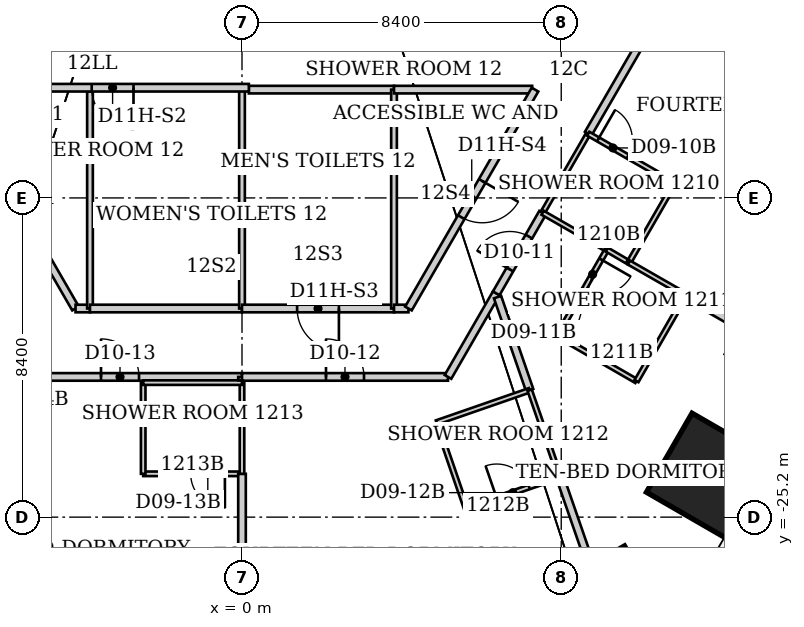
"""IFC4 building model, lengths in metres.
Left out: names, types, materials, properties, quantities, classifications, styles, units other than length and angle.
Written with IfcOpenShell. Run it as: python <this file> out.ifc"""

import sys

from ifc_helpers import new_model, si_unit, direction, frame, frame_2d, origin, origin_2d, place, context, subcontext, project, spatial, rectangle, extrude, clip, halfspace, element, fill, save


model = new_model("IFC4")
c1 = context("Model", 3, precision=1e-05, world=origin(), true_north=direction((0.0, 1.0)))
c2 = subcontext(c1, "Body", "Model", "MODEL_VIEW")
j1 = project(units=[si_unit("LENGTHUNIT", "METRE"), si_unit("PLANEANGLEUNIT", "RADIAN")], contexts=[c1])
p1 = place(None, origin())
s1 = spatial("IfcSite", under=j1, at=p1, CompositionType="ELEMENT")
p2 = place(p1, origin())
s2 = spatial("IfcBuilding", under=s1, at=p2, CompositionType="ELEMENT")
p3 = place(p2, frame((0.0, 0.0, 53.4)))
s3 = spatial("IfcBuildingStorey", under=s2, at=p3, CompositionType="ELEMENT", Elevation=53.4)
p4 = place(p3, frame((12.282, -24.105, 0.0), z_axis=(0.0, 0.0, 1.0), x_axis=(0.866025403784, -0.5, 0.0)))
e1 = element("IfcColumn", 1, at=p4, inside=s3, PredefinedType="COLUMN", context=c2, shape_type="SweptSolid", body=[
    clip(extrude(rectangle(XDim=2.4, YDim=2.4, at=origin_2d()), origin(), (0.0, 0.0, 1.0), 3.728), halfspace(frame((0.0, 0.0, 3.64)), False)),
])
p5 = place(p3, frame((9.106, -27.897, 0.0), z_axis=(0.0, 0.0, 1.0), x_axis=(0.5, -0.866025403784, 0.0)))
e2 = element("IfcColumn", 2, at=p5, inside=s3, PredefinedType="COLUMN", context=c2, shape_type="SweptSolid", body=[
    clip(extrude(rectangle(XDim=2.4, YDim=3.6, at=origin_2d()), origin(), (0.0, 0.0, 1.0), 3.726), halfspace(frame((0.0, 0.0, 3.64)), False)),
])
p6 = place(p3, frame((-5.42, -21.51, 0.0), z_axis=(0.0, 0.0, 1.0), x_axis=(1.0, 0.0, 0.0)))
e3 = element("IfcWall", 3, at=p6, inside=s3, PredefinedType="PARTITIONING", context=c2, shape_type="SweptSolid", body=[
    extrude(rectangle(XDim=5.42, YDim=0.2, at=frame_2d((2.71, 0.0))), origin(), (0.0, 0.0, 1.0), 3.64),
])
p7 = place(p6, frame((1.71, 0.0, 0.0)))
e4 = element("IfcOpeningElement", 4, at=p7, cuts=e3, PredefinedType="OPENING", context=c2, shape_type="SweptSolid", body=[
    extrude(rectangle(XDim=1.0, YDim=2.13, at=frame_2d((0.5, 1.065))), frame((0.0, 0.1, 0.0), z_axis=(0.0, -1.0, 0.0), x_axis=(1.0, 0.0, 0.0)), (0.0, 0.0, 1.0), 0.2),
])
p8 = place(p3, frame((-4.38, -19.71, 0.0), z_axis=(0.0, 0.0, 1.0), x_axis=(-0.500523653757, 0.865722860984, 0.0)))
e5 = element("IfcWall", 5, at=p8, inside=s3, PredefinedType="PARTITIONING", context=c2, shape_type="SweptSolid", body=[
    extrude(rectangle(XDim=6.628, YDim=0.2, at=frame_2d((3.314, 0.0))), origin(), (0.0, 0.0, 1.0), 3.64),
])
p9 = place(p8, frame((2.764, 0.0, 0.0)))
e6 = element("IfcOpeningElement", 6, at=p9, cuts=e5, PredefinedType="OPENING", context=c2, shape_type="SweptSolid", body=[
    extrude(rectangle(XDim=1.1, YDim=2.2, at=frame_2d((0.55, 1.1))), frame((0.0, 0.1, 0.0), z_axis=(0.0, -1.0, 0.0), x_axis=(1.0, 0.0, 0.0)), (0.0, 0.0, 1.0), 0.2),
])
p10 = place(p3, frame((-4.0, -19.71, 0.0), z_axis=(0.0, 0.0, 1.0), x_axis=(-1.0, 0.0, 0.0)))
e7 = element("IfcWall", 7, at=p10, inside=s3, PredefinedType="PARTITIONING", context=c2, shape_type="SweptSolid", body=[
    extrude(rectangle(XDim=0.38, YDim=0.2, at=frame_2d((0.19, 0.0))), origin(), (0.0, 0.0, 1.0), 3.64),
])
p11 = place(p3, frame((-4.0, -14.0, 0.0), z_axis=(0.0, 0.0, 1.0), x_axis=(0.0, -1.0, 0.0)))
e8 = element("IfcWall", 8, at=p11, inside=s3, PredefinedType="PARTITIONING", context=c2, shape_type="SweptSolid", body=[
    extrude(rectangle(XDim=5.71, YDim=0.15, at=frame_2d((2.855, 0.0))), origin(), (0.0, 0.0, 1.0), 3.64),
])
p12 = place(p3, frame((-2.6, -24.06, 0.0), z_axis=(0.0, 0.0, 1.0), x_axis=(1.0, 0.0, 0.0)))
e9 = element("IfcWall", 9, at=p12, inside=s3, PredefinedType="PARTITIONING", context=c2, shape_type="SweptSolid", body=[
    extrude(rectangle(XDim=2.6, YDim=0.12, at=frame_2d((1.3, 0.0))), origin(), (0.0, 0.0, 1.0), 3.64),
])
p13 = place(p12, frame((1.25, 0.0, 0.0)))
e10 = element("IfcOpeningElement", 10, at=p13, cuts=e9, PredefinedType="OPENING", context=c2, shape_type="SweptSolid", body=[
    extrude(rectangle(XDim=0.9, YDim=2.03, at=frame_2d((0.45, 1.015))), frame((0.0, 0.06, 0.0), z_axis=(0.0, -1.0, 0.0), x_axis=(1.0, 0.0, 0.0)), (0.0, 0.0, 1.0), 0.12),
])
p14 = place(p3, frame((-2.6, -21.66, 0.0), z_axis=(0.0, 0.0, 1.0), x_axis=(0.0, -1.0, 0.0)))
e11 = element("IfcWall", 11, at=p14, inside=s3, PredefinedType="PARTITIONING", context=c2, shape_type="SweptSolid", body=[
    extrude(rectangle(XDim=2.4, YDim=0.12, at=frame_2d((1.2, 0.0))), origin(), (0.0, 0.0, 1.0), 3.64),
])
p15 = place(p3, frame((0.0, -29.89, 0.0), z_axis=(0.0, 0.0, 1.0), x_axis=(0.0, 1.0, 0.0)))
e12 = element("IfcWall", 12, at=p15, inside=s3, PredefinedType="PARTITIONING", context=c2, shape_type="SweptSolid", body=[
    extrude(rectangle(XDim=5.83, YDim=0.2, at=frame_2d((2.915, 0.0))), origin(), (0.0, 0.0, 1.0), 2.86),
])
p16 = place(p3, frame((0.0, -24.06, 0.0), z_axis=(0.0, 0.0, 1.0), x_axis=(0.0, 1.0, 0.0)))
e13 = element("IfcWall", 13, at=p16, inside=s3, PredefinedType="PARTITIONING", context=c2, shape_type="SweptSolid", body=[
    extrude(rectangle(XDim=2.4, YDim=0.12, at=frame_2d((1.2, 0.0))), origin(), (0.0, 0.0, 1.0), 2.86),
])
p17 = place(p3, frame((0.0, -21.66, 0.0), z_axis=(0.0, 0.0, 1.0), x_axis=(-1.0, 0.0, 0.0)))
e14 = element("IfcWall", 14, at=p17, inside=s3, PredefinedType="PARTITIONING", context=c2, shape_type="SweptSolid", body=[
    extrude(rectangle(XDim=2.6, YDim=0.12, at=frame_2d((1.3, 0.0))), origin(), (0.0, 0.0, 1.0), 3.64),
])
p18 = place(p3, frame((0.0, -21.6, 0.0), z_axis=(0.0, 0.0, 1.0), x_axis=(0.0, 1.0, 0.0)))
e15 = element("IfcWall", 15, at=p18, inside=s3, PredefinedType="PARTITIONING", context=c2, shape_type="SweptSolid", body=[
    extrude(rectangle(XDim=0.09, YDim=0.2, at=frame_2d((0.045, 0.0))), origin(), (0.0, 0.0, 1.0), 3.64),
])
p19 = place(p3, frame((0.0, -21.51, 0.0), z_axis=(0.0, 0.0, 1.0), x_axis=(1.0, 0.0, 0.0)))
e16 = element("IfcWall", 16, at=p19, inside=s3, PredefinedType="PARTITIONING", context=c2, shape_type="SweptSolid", body=[
    extrude(rectangle(XDim=5.42, YDim=0.2, at=frame_2d((2.71, 0.0))), origin(), (0.0, 0.0, 1.0), 3.64),
])
p20 = place(p19, frame((2.21, 0.0, 0.0)))
e17 = element("IfcOpeningElement", 17, at=p20, cuts=e16, PredefinedType="OPENING", context=c2, shape_type="SweptSolid", body=[
    extrude(rectangle(XDim=1.0, YDim=2.13, at=frame_2d((0.5, 1.065))), frame((0.0, 0.1, 0.0), z_axis=(0.0, -1.0, 0.0), x_axis=(1.0, 0.0, 0.0)), (0.0, 0.0, 1.0), 0.2),
])
p21 = place(p3, frame((0.0, -19.71, 0.0), z_axis=(0.0, 0.0, 1.0), x_axis=(-1.0, 0.0, 0.0)))
e18 = element("IfcWall", 18, at=p21, inside=s3, PredefinedType="PARTITIONING", context=c2, shape_type="SweptSolid", body=[
    extrude(rectangle(XDim=4.0, YDim=0.2, at=frame_2d((2.0, 0.0))), origin(), (0.0, 0.0, 1.0), 3.64),
])
p22 = place(p3, frame((0.0, -13.95, 0.0), z_axis=(0.0, 0.0, 1.0), x_axis=(0.0, -1.0, 0.0)))
e19 = element("IfcWall", 19, at=p22, inside=s3, PredefinedType="PARTITIONING", context=c2, shape_type="SweptSolid", body=[
    extrude(rectangle(XDim=5.76, YDim=0.15, at=frame_2d((2.88, 0.0))), origin(), (0.0, 0.0, 1.0), 2.86),
])
p23 = place(p3, frame((0.18, -13.95, 0.0), z_axis=(0.0, 0.0, 1.0), x_axis=(1.0, 0.0, 0.0)))
e20 = element("IfcWall", 20, at=p23, inside=s3, PredefinedType="PARTITIONING", context=c2, shape_type="SweptSolid", body=[
    extrude(rectangle(XDim=3.82, YDim=0.2, at=frame_2d((1.91, 0.0))), origin(), (0.0, 0.0, 1.0), 3.64),
])
p24 = place(p3, frame((0.18, -13.9, 0.0), z_axis=(0.0, 0.0, 1.0), x_axis=(-1.0, 0.0, 0.0)))
e21 = element("IfcWall", 21, at=p24, inside=s3, PredefinedType="PARTITIONING", context=c2, shape_type="SweptSolid", body=[
    extrude(rectangle(XDim=7.97, YDim=0.2, at=frame_2d((3.985, 0.0))), origin(), (0.0, 0.0, 1.0), 3.64),
])
p25 = place(p24, frame((3.035, 0.0, 0.0)))
e22 = element("IfcOpeningElement", 22, at=p25, cuts=e21, PredefinedType="OPENING", context=c2, shape_type="SweptSolid", body=[
    extrude(rectangle(XDim=1.1, YDim=2.2, at=frame_2d((0.55, 1.1))), frame((0.0, 0.1, 0.0), z_axis=(0.0, -1.0, 0.0), x_axis=(1.0, 0.0, 0.0)), (0.0, 0.0, 1.0), 0.2),
])
p26 = place(p3, frame((4.0, -19.71, 0.0), z_axis=(0.0, 0.0, 1.0), x_axis=(-1.0, 0.0, 0.0)))
e23 = element("IfcWall", 23, at=p26, inside=s3, PredefinedType="PARTITIONING", context=c2, shape_type="SweptSolid", body=[
    extrude(rectangle(XDim=4.0, YDim=0.2, at=frame_2d((2.0, 0.0))), origin(), (0.0, 0.0, 1.0), 3.64),
])
p27 = place(p26, frame((1.45, 0.0, 0.0)))
e24 = element("IfcOpeningElement", 24, at=p27, cuts=e23, PredefinedType="OPENING", context=c2, shape_type="SweptSolid", body=[
    extrude(rectangle(XDim=1.1, YDim=2.2, at=frame_2d((0.55, 1.1))), frame((0.0, 0.1, 0.0), z_axis=(0.0, -1.0, 0.0), x_axis=(1.0, 0.0, 0.0)), (0.0, 0.0, 1.0), 0.2),
])
p28 = place(p3, frame((4.0, -13.95, 0.0), z_axis=(0.0, 0.0, 1.0), x_axis=(0.0, -1.0, 0.0)))
e25 = element("IfcWall", 25, at=p28, inside=s3, PredefinedType="PARTITIONING", context=c2, shape_type="SweptSolid", body=[
    extrude(rectangle(XDim=5.76, YDim=0.15, at=frame_2d((2.88, 0.0))), origin(), (0.0, 0.0, 1.0), 3.64),
])
p29 = place(p3, frame((4.0, -13.95, 0.0), z_axis=(0.0, 0.0, 1.0), x_axis=(1.0, 0.0, 0.0)))
e26 = element("IfcWall", 26, at=p29, inside=s3, PredefinedType="PARTITIONING", context=c2, shape_type="SweptSolid", body=[
    extrude(rectangle(XDim=3.635, YDim=0.2, at=frame_2d((1.817, 0.0))), origin(), (0.0, 0.0, 1.0), 3.64),
])
p30 = place(p3, frame((4.38, -19.71, 0.0), z_axis=(0.0, 0.0, 1.0), x_axis=(-1.0, 0.0, 0.0)))
e27 = element("IfcWall", 27, at=p30, inside=s3, PredefinedType="PARTITIONING", context=c2, shape_type="SweptSolid", body=[
    extrude(rectangle(XDim=0.38, YDim=0.2, at=frame_2d((0.19, 0.0))), origin(), (0.0, 0.0, 1.0), 3.64),
])
p31 = place(p3, frame((5.12, -22.71, 0.0), z_axis=(0.0, 0.0, 1.0), x_axis=(0.324880771143, -0.945754981241, 0.0)))
e28 = element("IfcWall", 28, at=p31, inside=s3, PredefinedType="PARTITIONING", context=c2, shape_type="SweptSolid", body=[
    extrude(rectangle(XDim=2.4, YDim=0.12, at=frame_2d((1.2, 0.0))), origin(), (0.0, 0.0, 1.0), 3.64),
])
p32 = place(p3, frame((5.42, -21.51, 0.0), z_axis=(0.0, 0.0, 1.0), x_axis=(0.499963722229, 0.866046347752, 0.0)))
e29 = element("IfcWall", 29, at=p32, inside=s3, PredefinedType="PARTITIONING", context=c2, shape_type="SweptSolid", body=[
    extrude(rectangle(XDim=2.54, YDim=0.2, at=frame_2d((1.27, 0.0))), origin(), (0.0, 0.0, 1.0), 3.64),
])
p33 = place(p3, frame((5.9, -24.98, 0.0), z_axis=(0.0, 0.0, 1.0), x_axis=(0.945165466094, 0.326591857987, 0.0)))
e30 = element("IfcWall", 30, at=p33, inside=s3, PredefinedType="PARTITIONING", context=c2, shape_type="SweptSolid", body=[
    extrude(rectangle(XDim=2.603, YDim=0.12, at=frame_2d((1.302, 0.0))), origin(), (0.0, 0.0, 1.0), 3.64),
])
p34 = place(p33, frame((0.85, 0.0, 0.0)))
e31 = element("IfcOpeningElement", 31, at=p34, cuts=e30, PredefinedType="OPENING", context=c2, shape_type="SweptSolid", body=[
    extrude(rectangle(XDim=0.9, YDim=2.03, at=frame_2d((0.45, 1.015))), frame((0.0, 0.06, 0.0), z_axis=(0.0, -1.0, 0.0), x_axis=(1.0, 0.0, 0.0)), (0.0, 0.0, 1.0), 0.12),
])
p35 = place(p3, frame((6.69, -19.31, 0.0), z_axis=(0.0, 0.0, 1.0), x_axis=(0.498748634132, 0.866746675766, 0.0)))
e32 = element("IfcWall", 32, at=p35, inside=s3, PredefinedType="PARTITIONING", context=c2, shape_type="SweptSolid", body=[
    extrude(rectangle(XDim=2.446, YDim=0.2, at=frame_2d((1.223, 0.0))), origin(), (0.0, 0.0, 1.0), 3.64),
])
p36 = place(p35, frame((0.723, 0.0, 0.0)))
e33 = element("IfcOpeningElement", 33, at=p36, cuts=e32, PredefinedType="OPENING", context=c2, shape_type="SweptSolid", body=[
    extrude(rectangle(XDim=1.0, YDim=2.13, at=frame_2d((0.5, 1.065))), frame((0.0, 0.1, 0.0), z_axis=(0.0, -1.0, 0.0), x_axis=(1.0, 0.0, 0.0)), (0.0, 0.0, 1.0), 0.2),
])
p37 = place(p3, frame((6.724, -19.409, 0.0), z_axis=(0.0, 0.0, 1.0), x_axis=(0.326182205696, -0.945306917719, 0.0)))
e34 = element("IfcWall", 34, at=p37, inside=s3, PredefinedType="PARTITIONING", context=c2, shape_type="SweptSolid", body=[
    extrude(rectangle(XDim=2.593, YDim=0.2, at=frame_2d((1.296, 0.0))), origin(), (0.0, 0.0, 1.0), 3.64),
])
p38 = place(p3, frame((7.57, -21.86, 0.0), z_axis=(0.0, 0.0, 1.0), x_axis=(-0.944782191137, -0.327698964463, 0.0)))
e35 = element("IfcWall", 35, at=p38, inside=s3, PredefinedType="PARTITIONING", context=c2, shape_type="SweptSolid", body=[
    extrude(rectangle(XDim=2.594, YDim=0.12, at=frame_2d((1.297, 0.0))), origin(), (0.0, 0.0, 1.0), 3.64),
])
p39 = place(p3, frame((7.57, -21.86, 0.0), z_axis=(0.0, 0.0, 1.0), x_axis=(0.327706459026, -0.944779591605, 0.0)))
e36 = element("IfcWall", 36, at=p39, inside=s3, PredefinedType="PARTITIONING", context=c2, shape_type="SweptSolid", body=[
    extrude(rectangle(XDim=2.35, YDim=0.12, at=frame_2d((1.175, 0.0))), origin(), (0.0, 0.0, 1.0), 3.64),
])
p40 = place(p3, frame((7.71, -13.95, 0.0), z_axis=(0.0, 0.0, 1.0), x_axis=(-0.500511113963, -0.865730110831, 0.0)))
e37 = element("IfcWall", 37, at=p40, inside=s3, PredefinedType="PARTITIONING", context=c2, shape_type="SweptSolid", body=[
    extrude(rectangle(XDim=6.653, YDim=0.2, at=frame_2d((3.327, 0.0))), origin(), (0.0, 0.0, 1.0), 3.64),
])
p41 = place(p40, frame((2.777, 0.0, 0.0)))
e38 = element("IfcOpeningElement", 38, at=p41, cuts=e37, PredefinedType="OPENING", context=c2, shape_type="SweptSolid", body=[
    extrude(rectangle(XDim=1.1, YDim=2.2, at=frame_2d((0.55, 1.1))), frame((0.0, 0.1, 0.0), z_axis=(0.0, -1.0, 0.0), x_axis=(1.0, 0.0, 0.0)), (0.0, 0.0, 1.0), 0.2),
])
p42 = place(p3, frame((7.91, -17.19, 0.0), z_axis=(0.0, 0.0, 1.0), x_axis=(0.499737123639, 0.866177122335, 0.0)))
e39 = element("IfcWall", 39, at=p42, inside=s3, PredefinedType="PARTITIONING", context=c2, shape_type="SweptSolid", body=[
    extrude(rectangle(XDim=2.401, YDim=0.12, at=frame_2d((1.201, 0.0))), origin(), (0.0, 0.0, 1.0), 3.64),
])
p43 = place(p3, frame((7.91, -17.19, 0.0), z_axis=(0.0, 0.0, 1.0), x_axis=(0.8673242112, -0.497743621421, 0.0)))
e40 = element("IfcWall", 40, at=p43, inside=s3, PredefinedType="PARTITIONING", context=c2, shape_type="SweptSolid", body=[
    extrude(rectangle(XDim=1.949, YDim=0.12, at=frame_2d((0.974, 0.0))), origin(), (0.0, 0.0, 1.0), 3.64),
])
p44 = place(p3, frame((8.3, -20.42, 0.0), z_axis=(0.0, 0.0, 1.0), x_axis=(0.866177122335, -0.499737123639, 0.0)))
e41 = element("IfcWall", 41, at=p44, inside=s3, PredefinedType="PARTITIONING", context=c2, shape_type="SweptSolid", body=[
    extrude(rectangle(XDim=2.401, YDim=0.12, at=frame_2d((1.201, 0.0))), origin(), (0.0, 0.0, 1.0), 3.64),
])
p45 = place(p3, frame((8.36, -24.13, 0.0), z_axis=(0.0, 0.0, 1.0), x_axis=(0.327332811485, -0.944909112309, 0.0)))
e42 = element("IfcWall", 42, at=p45, inside=s3, PredefinedType="PARTITIONING", context=c2, shape_type="SweptSolid", body=[
    extrude(rectangle(XDim=5.621, YDim=0.2, at=frame_2d((2.811, 0.0))), origin(), (0.0, 0.0, 1.0), 3.64),
])
p46 = place(p3, frame((9.11, -15.11, 0.0), z_axis=(0.0, 0.0, 1.0), x_axis=(0.50119856319, 0.865332306259, 0.0)))
e43 = element("IfcWall", 43, at=p46, inside=s3, PredefinedType="PARTITIONING", context=c2, shape_type="SweptSolid", body=[
    extrude(rectangle(XDim=6.345, YDim=0.2, at=frame_2d((3.172, 0.0))), origin(), (0.0, 0.0, 1.0), 3.64),
])
p47 = place(p46, frame((2.672, 0.0, 0.0)))
e44 = element("IfcOpeningElement", 44, at=p47, cuts=e43, PredefinedType="OPENING", context=c2, shape_type="SweptSolid", body=[
    extrude(rectangle(XDim=1.0, YDim=2.13, at=frame_2d((0.5, 1.065))), frame((0.0, 0.1, 0.0), z_axis=(0.0, -1.0, 0.0), x_axis=(1.0, 0.0, 0.0)), (0.0, 0.0, 1.0), 0.2),
])
p48 = place(p3, frame((9.6, -18.16, 0.0), z_axis=(0.0, 0.0, 1.0), x_axis=(-0.498627694264, -0.866816256489, 0.0)))
e45 = element("IfcWall", 45, at=p48, inside=s3, PredefinedType="PARTITIONING", context=c2, shape_type="SweptSolid", body=[
    extrude(rectangle(XDim=2.607, YDim=0.12, at=frame_2d((1.304, 0.0))), origin(), (0.0, 0.0, 1.0), 3.64),
])
p49 = place(p48, frame((0.3, 0.0, 0.0)))
e46 = element("IfcOpeningElement", 46, at=p49, cuts=e45, PredefinedType="OPENING", context=c2, shape_type="SweptSolid", body=[
    extrude(rectangle(XDim=0.9, YDim=2.03, at=frame_2d((0.45, 1.015))), frame((0.0, 0.06, 0.0), z_axis=(0.0, -1.0, 0.0), x_axis=(1.0, 0.0, 0.0)), (0.0, 0.0, 1.0), 0.12),
])
p50 = place(p3, frame((9.6, -18.16, 0.0), z_axis=(0.0, 0.0, 1.0), x_axis=(0.862577739272, -0.505924543497, 0.0)))
e47 = element("IfcWall", 47, at=p50, inside=s3, PredefinedType="PARTITIONING", context=c2, shape_type="SweptSolid", body=[
    extrude(rectangle(XDim=0.672, YDim=0.12, at=frame_2d((0.336, 0.0))), origin(), (0.0, 0.0, 1.0), 3.64),
])
p51 = place(p3, frame((10.18, -18.5, 0.0), z_axis=(0.0, 0.0, 1.0), x_axis=(0.499693115345, 0.866202511239, 0.0)))
e48 = element("IfcWall", 48, at=p51, inside=s3, PredefinedType="PARTITIONING", context=c2, shape_type="SweptSolid", body=[
    extrude(rectangle(XDim=2.401, YDim=0.12, at=frame_2d((1.201, 0.0))), origin(), (0.0, 0.0, 1.0), 3.64),
])
p52 = place(p3, frame((10.18, -18.5, 0.0), z_axis=(0.0, 0.0, 1.0), x_axis=(0.867564547129, -0.497324598794, 0.0)))
e49 = element("IfcWall", 49, at=p52, inside=s3, PredefinedType="PARTITIONING", context=c2, shape_type="SweptSolid", body=[
    extrude(rectangle(XDim=1.729, YDim=0.12, at=frame_2d((0.865, 0.0))), origin(), (0.0, 0.0, 1.0), 3.64),
])
p53 = place(p3, frame((10.38, -21.62, 0.0), z_axis=(0.0, 0.0, 1.0), x_axis=(0.498627694264, 0.866816256489, 0.0)))
e50 = element("IfcWall", 50, at=p53, inside=s3, PredefinedType="PARTITIONING", context=c2, shape_type="SweptSolid", body=[
    extrude(rectangle(XDim=2.607, YDim=0.12, at=frame_2d((1.304, 0.0))), origin(), (0.0, 0.0, 1.0), 3.64),
])
p54 = place(p3, frame((11.38, -16.42, 0.0), z_axis=(0.0, 0.0, 1.0), x_axis=(-0.866154567199, 0.49977621564, 0.0)))
e51 = element("IfcWall", 51, at=p54, inside=s3, PredefinedType="PARTITIONING", context=c2, shape_type="SweptSolid", body=[
    extrude(rectangle(XDim=2.621, YDim=0.12, at=frame_2d((1.311, 0.0))), origin(), (0.0, 0.0, 1.0), 2.878),
])
p55 = place(p54, frame((1.421, 0.0, 0.0)))
e52 = element("IfcOpeningElement", 52, at=p55, cuts=e51, PredefinedType="OPENING", context=c2, shape_type="SweptSolid", body=[
    extrude(rectangle(XDim=0.9, YDim=2.03, at=frame_2d((0.45, 1.015))), frame((0.0, 0.06, 0.0), z_axis=(0.0, -1.0, 0.0), x_axis=(1.0, 0.0, 0.0)), (0.0, 0.0, 1.0), 0.12),
])
p56 = place(p3, frame((11.68, -19.36, 0.0), z_axis=(0.0, 0.0, 1.0), x_axis=(0.865885444553, -0.500242338183, 0.0)))
e53 = element("IfcWall", 53, at=p56, inside=s3, PredefinedType="PARTITIONING", context=c2, shape_type="SweptSolid", body=[
    extrude(rectangle(XDim=4.038, YDim=0.2, at=frame_2d((2.019, 0.0))), origin(), (0.0, 0.0, 1.0), 3.64),
])
p57 = place(p55, origin())
e54 = element("IfcDoor", 54, at=p57, inside=s3, OperationType="SINGLE_SWING_RIGHT", PredefinedType="DOOR", context=c2, shape_type="SweptSolid", body=[
    extrude(rectangle(XDim=0.9, YDim=2.03, at=frame_2d((0.45, 1.015))), frame((0.0, 0.025, 0.0), z_axis=(0.0, -1.0, 0.0), x_axis=(1.0, 0.0, 0.0)), (0.0, 0.0, 1.0), 0.05),
])
fill(e52, e54)
p58 = place(p36, origin())
e55 = element("IfcDoor", 55, at=p58, inside=s3, OperationType="SINGLE_SWING_LEFT", PredefinedType="DOOR", context=c2, shape_type="SweptSolid", body=[
    extrude(rectangle(XDim=1.0, YDim=2.13, at=frame_2d((0.5, 1.065))), frame((0.0, 0.025, 0.0), z_axis=(0.0, -1.0, 0.0), x_axis=(1.0, 0.0, 0.0)), (0.0, 0.0, 1.0), 0.05),
])
fill(e33, e55)
p59 = place(p49, origin())
e56 = element("IfcDoor", 56, at=p59, inside=s3, OperationType="SINGLE_SWING_LEFT", PredefinedType="DOOR", context=c2, shape_type="SweptSolid", body=[
    extrude(rectangle(XDim=0.9, YDim=2.03, at=frame_2d((0.45, 1.015))), frame((0.0, 0.025, 0.0), z_axis=(0.0, -1.0, 0.0), x_axis=(1.0, 0.0, 0.0)), (0.0, 0.0, 1.0), 0.05),
])
fill(e46, e56)
p60 = place(p20, origin())
e57 = element("IfcDoor", 57, at=p60, inside=s3, OperationType="SINGLE_SWING_LEFT", PredefinedType="DOOR", context=c2, shape_type="SweptSolid", body=[
    extrude(rectangle(XDim=1.0, YDim=2.13, at=frame_2d((0.5, 1.065))), frame((0.0, 0.025, 0.0), z_axis=(0.0, -1.0, 0.0), x_axis=(1.0, 0.0, 0.0)), (0.0, 0.0, 1.0), 0.05),
])
fill(e17, e57)
p61 = place(p34, origin())
e58 = element("IfcDoor", 58, at=p61, inside=s3, OperationType="SINGLE_SWING_LEFT", PredefinedType="DOOR", context=c2, shape_type="SweptSolid", body=[
    extrude(rectangle(XDim=0.9, YDim=2.03, at=frame_2d((0.45, 1.015))), frame((0.0, 0.025, 0.0), z_axis=(0.0, -1.0, 0.0), x_axis=(1.0, 0.0, 0.0)), (0.0, 0.0, 1.0), 0.05),
])
fill(e31, e58)
p62 = place(p7, origin())
e59 = element("IfcDoor", 59, at=p62, inside=s3, OperationType="SINGLE_SWING_LEFT", PredefinedType="DOOR", context=c2, shape_type="SweptSolid", body=[
    extrude(rectangle(XDim=1.0, YDim=2.13, at=frame_2d((0.5, 1.065))), frame((0.0, 0.025, 0.0), z_axis=(0.0, -1.0, 0.0), x_axis=(1.0, 0.0, 0.0)), (0.0, 0.0, 1.0), 0.05),
])
fill(e4, e59)
p63 = place(p13, origin())
e60 = element("IfcDoor", 60, at=p63, inside=s3, OperationType="SINGLE_SWING_RIGHT", PredefinedType="DOOR", context=c2, shape_type="SweptSolid", body=[
    extrude(rectangle(XDim=0.9, YDim=2.03, at=frame_2d((0.45, 1.015))), frame((0.0, 0.025, 0.0), z_axis=(0.0, -1.0, 0.0), x_axis=(1.0, 0.0, 0.0)), (0.0, 0.0, 1.0), 0.05),
])
fill(e10, e60)
p64 = place(p25, origin())
e61 = element("IfcDoor", 61, at=p64, inside=s3, OperationType="SINGLE_SWING_LEFT", PredefinedType="DOOR", context=c2, shape_type="SweptSolid", body=[
    extrude(rectangle(XDim=1.1, YDim=2.2, at=frame_2d((0.55, 1.1))), frame((0.0, 0.025, 0.0), z_axis=(0.0, -1.0, 0.0), x_axis=(1.0, 0.0, 0.0)), (0.0, 0.0, 1.0), 0.05),
])
fill(e22, e61)
p65 = place(p27, origin())
e62 = element("IfcDoor", 62, at=p65, inside=s3, OperationType="SINGLE_SWING_LEFT", PredefinedType="DOOR", context=c2, shape_type="SweptSolid", body=[
    extrude(rectangle(XDim=1.1, YDim=2.2, at=frame_2d((0.55, 1.1))), frame((0.0, 0.025, 0.0), z_axis=(0.0, -1.0, 0.0), x_axis=(1.0, 0.0, 0.0)), (0.0, 0.0, 1.0), 0.05),
])
fill(e24, e62)
p66 = place(p41, origin())
e63 = element("IfcDoor", 63, at=p66, inside=s3, OperationType="SINGLE_SWING_LEFT", PredefinedType="DOOR", context=c2, shape_type="SweptSolid", body=[
    extrude(rectangle(XDim=1.1, YDim=2.2, at=frame_2d((0.55, 1.1))), frame((0.0, 0.025, 0.0), z_axis=(0.0, -1.0, 0.0), x_axis=(1.0, 0.0, 0.0)), (0.0, 0.0, 1.0), 0.05),
])
fill(e38, e63)
save(model, sys.argv[1])
